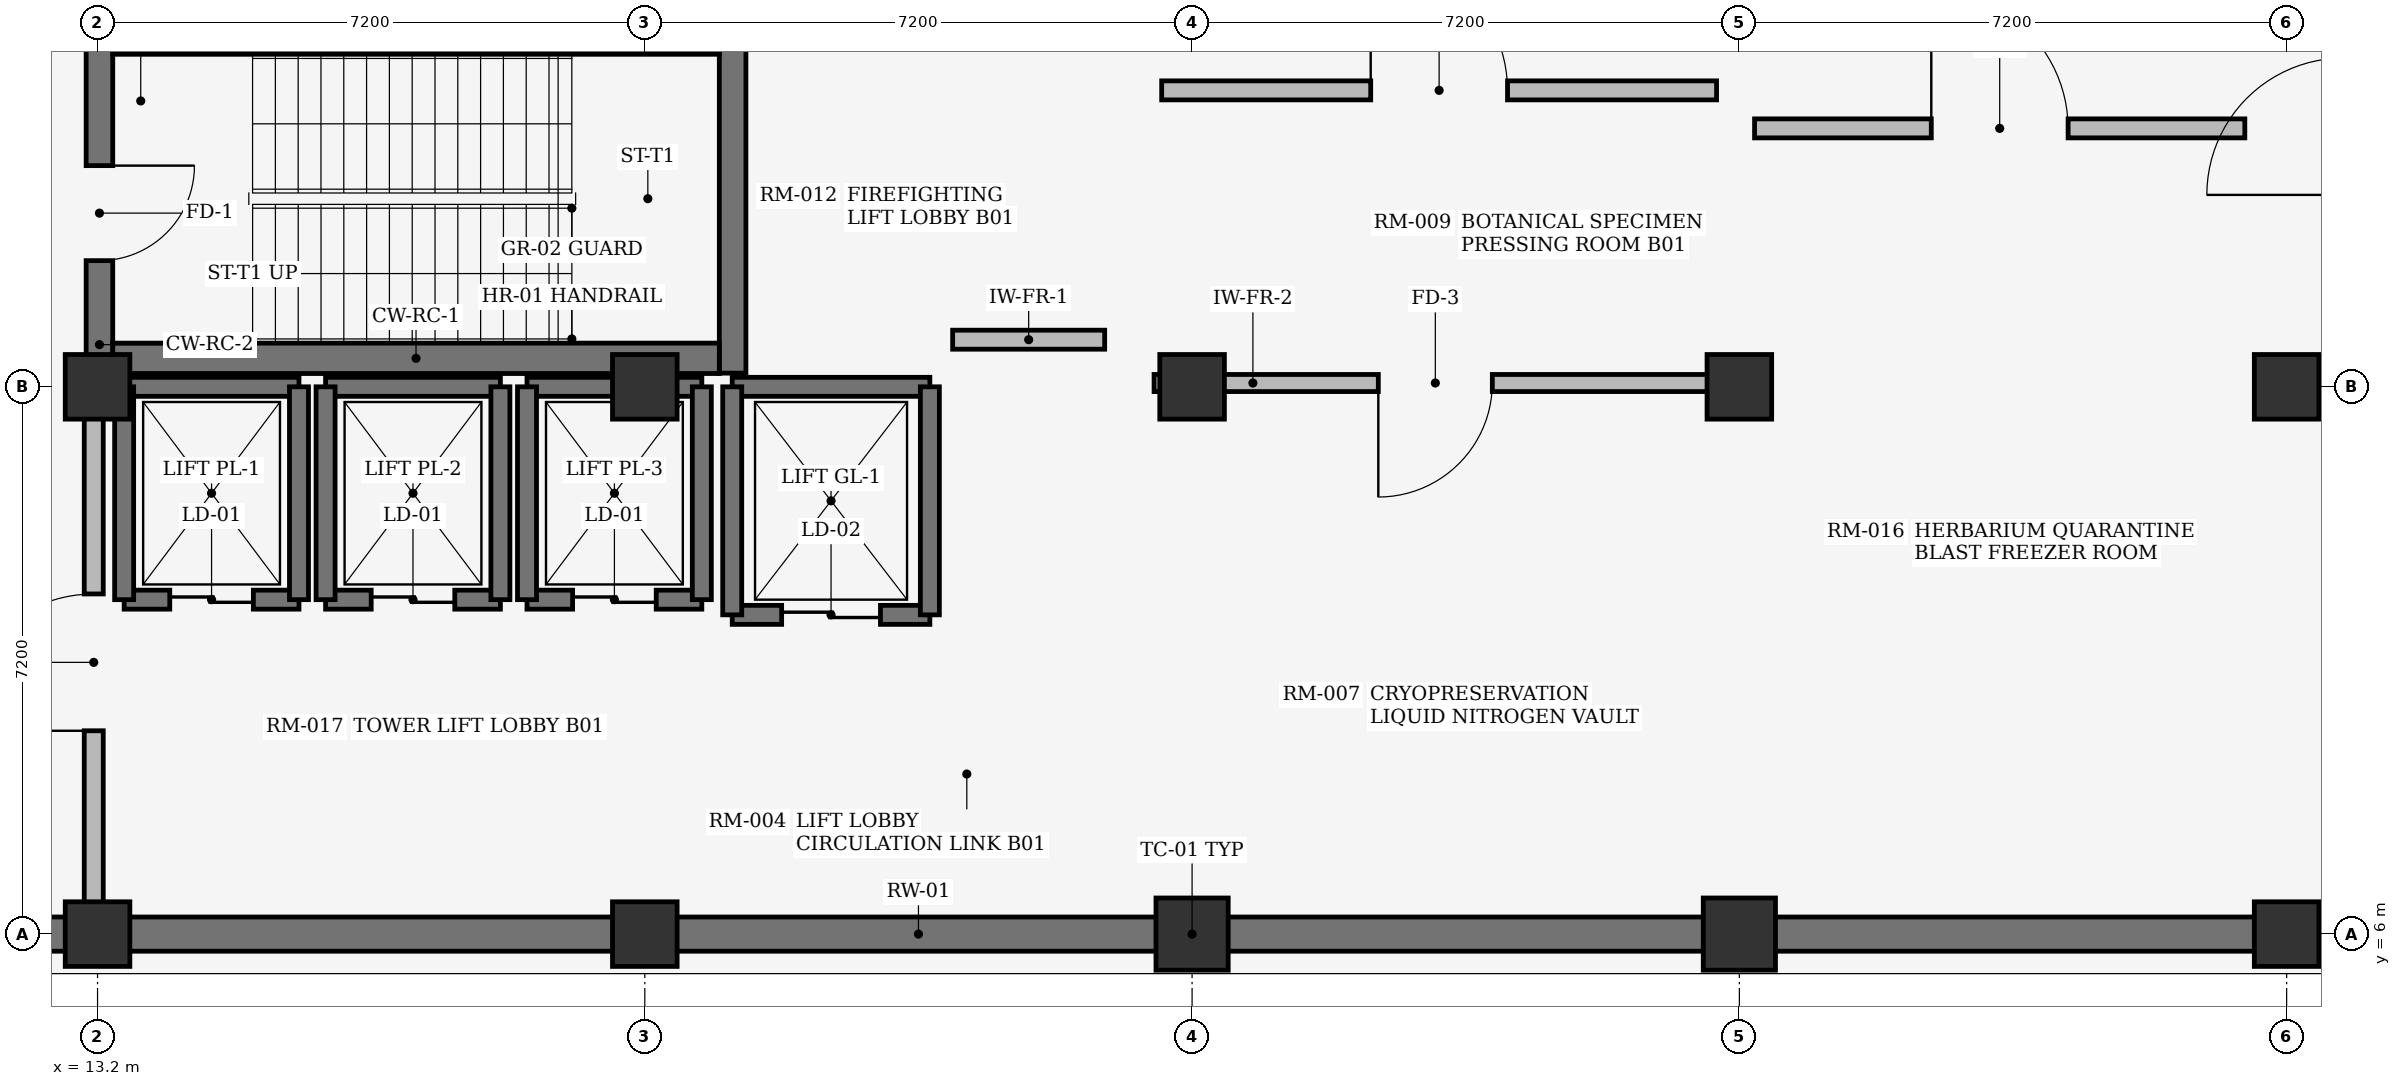
"""IFC4 building model, lengths in metres.
Left out: names, types, materials, properties, quantities, classifications, styles, units other than length and angle.
Written with IfcOpenShell. Run it as: python <this file> out.ifc"""

import sys

from ifc_helpers import new_model, si_unit, direction, frame, frame_2d, origin, origin_2d, place, context, subcontext, project, spatial, rectangle, extrude, element, fill, save


model = new_model("IFC4")
c1 = context("Model", 3, precision=1e-05, world=origin(), true_north=direction((0.0, 1.0)))
c2 = subcontext(c1, "Body", "Model", "MODEL_VIEW")
j1 = project(units=[si_unit("LENGTHUNIT", "METRE"), si_unit("PLANEANGLEUNIT", "RADIAN")], contexts=[c1])
p1 = place(None, origin())
s1 = spatial("IfcSite", under=j1, at=p1, CompositionType="ELEMENT")
p2 = place(p1, origin())
s2 = spatial("IfcBuilding", under=s1, at=p2, CompositionType="ELEMENT")
p3 = place(p2, frame((0.0, 0.0, -4.8)))
s3 = spatial("IfcBuildingStorey", under=s2, at=p3, CompositionType="ELEMENT", Elevation=-4.8)
for number, where, z_axis, x_axis in (
    (1, (13.2, 6.0, 0.0), (0.0, 0.0, 1.0), (1.0, 0.0, 0.0)),
    (2, (13.2, 13.2, 0.0), (0.0, 0.0, 1.0), (1.0, 0.0, 0.0)),
    (3, (20.4, 6.0, 0.0), (0.0, 0.0, 1.0), (1.0, 0.0, 0.0)),
    (4, (20.4, 13.2, 0.0), (0.0, 0.0, 1.0), (1.0, 0.0, 0.0)),
):
    element("IfcColumn", number, at=place(p3, frame(where, z_axis=z_axis, x_axis=x_axis)), inside=s3, PredefinedType="COLUMN", context=c2, shape_type="SweptSolid", body=[
        extrude(rectangle(XDim=0.85, YDim=0.85, at=origin_2d()), origin(), (0.0, 0.0, 1.0), 4.5),
    ])
p4 = place(p3, frame((27.6, 6.0, 0.0), z_axis=(0.0, 0.0, 1.0), x_axis=(1.0, 0.0, 0.0)))
e5 = element("IfcColumn", 5, at=p4, inside=s3, PredefinedType="COLUMN", context=c2, shape_type="SweptSolid", body=[
    extrude(rectangle(XDim=0.95, YDim=0.95, at=origin_2d()), origin(), (0.0, 0.0, 1.0), 4.5),
])
p5 = place(p3, frame((27.6, 13.2, 0.0), z_axis=(0.0, 0.0, 1.0), x_axis=(1.0, 0.0, 0.0)))
e6 = element("IfcColumn", 6, at=p5, inside=s3, PredefinedType="COLUMN", context=c2, shape_type="SweptSolid", body=[
    extrude(rectangle(XDim=0.85, YDim=0.85, at=origin_2d()), origin(), (0.0, 0.0, 1.0), 4.5),
])
p6 = place(p3, frame((34.8, 6.0, 0.0), z_axis=(0.0, 0.0, 1.0), x_axis=(1.0, 0.0, 0.0)))
e7 = element("IfcColumn", 7, at=p6, inside=s3, PredefinedType="COLUMN", context=c2, shape_type="SweptSolid", body=[
    extrude(rectangle(XDim=0.95, YDim=0.95, at=origin_2d()), origin(), (0.0, 0.0, 1.0), 4.5),
])
for number, where, z_axis, x_axis in (
    (8, (34.8, 13.2, 0.0), (0.0, 0.0, 1.0), (1.0, 0.0, 0.0)),
    (9, (42.0, 6.0, 0.0), (0.0, 0.0, 1.0), (1.0, 0.0, 0.0)),
    (10, (42.0, 13.2, 0.0), (0.0, 0.0, 1.0), (1.0, 0.0, 0.0)),
):
    element("IfcColumn", number, at=place(p3, frame(where, z_axis=z_axis, x_axis=x_axis)), inside=s3, PredefinedType="COLUMN", context=c2, shape_type="SweptSolid", body=[
        extrude(rectangle(XDim=0.85, YDim=0.85, at=origin_2d()), origin(), (0.0, 0.0, 1.0), 4.5),
    ])
p7 = place(p3, frame((6.0, 6.0, 0.0), z_axis=(0.0, 0.0, 1.0), x_axis=(1.0, 0.0, 0.0)))
e11 = element("IfcWall", 11, at=p7, inside=s3, PredefinedType="USERDEFINED", context=c2, shape_type="SweptSolid", body=[
    extrude(rectangle(XDim=36.0, YDim=0.45, at=frame_2d((18.0, 0.0))), origin(), (0.0, 0.0, 1.0), 4.5),
])
p8 = place(p3, frame((42.0, 6.0, 0.0), z_axis=(0.0, 0.0, 1.0), x_axis=(1.0, 0.0, 0.0)))
e12 = element("IfcWall", 12, at=p8, inside=s3, PredefinedType="USERDEFINED", context=c2, shape_type="SweptSolid", body=[
    extrude(rectangle(XDim=45.0, YDim=0.45, at=frame_2d((22.5, 0.0))), origin(), (0.0, 0.0, 1.0), 4.5),
])
p9 = place(p3, frame((13.225, 13.0, 0.0), z_axis=(0.0, 0.0, 1.0), x_axis=(0.0, 1.0, 0.0)))
e13 = element("IfcWall", 13, at=p9, inside=s3, PredefinedType="SHEAR", context=c2, shape_type="SweptSolid", body=[
    extrude(rectangle(XDim=4.97, YDim=0.35, at=frame_2d((2.485, 0.0))), origin(), (0.0, 0.0, 1.0), 4.5),
])
p10 = place(p9, frame((1.86, 0.0, 0.0)))
e14 = element("IfcOpeningElement", 14, at=p10, cuts=e13, PredefinedType="OPENING", context=c2, shape_type="SweptSolid", body=[
    extrude(rectangle(XDim=1.25, YDim=2.2, at=frame_2d((0.625, 1.1))), frame((0.0, 0.185, 0.0), z_axis=(0.0, -1.0, 0.0), x_axis=(1.0, 0.0, 0.0)), (0.0, 0.0, 1.0), 0.37),
])
p11 = place(p3, frame((21.555, 13.38, 0.0), z_axis=(0.0, 0.0, 1.0), x_axis=(0.0, 1.0, 0.0)))
e15 = element("IfcWall", 15, at=p11, inside=s3, PredefinedType="SHEAR", context=c2, shape_type="SweptSolid", body=[
    extrude(rectangle(XDim=4.59, YDim=0.35, at=frame_2d((2.295, 0.0))), origin(), (0.0, 0.0, 1.0), 4.5),
])
for number, where, z_axis, x_axis in (
    (16, (13.4, 13.575, 0.0), (0.0, 0.0, 1.0), (1.0, 0.0, 0.0)),
    (17, (13.4, 17.775, 0.0), (0.0, 0.0, 1.0), (1.0, 0.0, 0.0)),
):
    element("IfcWall", number, at=place(p3, frame(where, z_axis=z_axis, x_axis=x_axis)), inside=s3, PredefinedType="SHEAR", context=c2, shape_type="SweptSolid", body=[
        extrude(rectangle(XDim=7.98, YDim=0.4, at=frame_2d((3.99, 0.0))), origin(), (0.0, 0.0, 1.0), 4.5),
    ])
p12 = place(p3, frame((13.55, 10.4, 0.0), z_axis=(0.0, 0.0, 1.0), x_axis=(1.0, 0.0, 0.0)))
e18 = element("IfcWall", 18, at=p12, inside=s3, PredefinedType="SHEAR", context=c2, shape_type="SweptSolid", body=[
    extrude(rectangle(XDim=2.3, YDim=0.25, at=frame_2d((1.15, 0.0))), origin(), (0.0, 0.0, 1.0), 4.5),
])
p13 = place(p12, frame((0.6, 0.0, 0.0)))
e19 = element("IfcOpeningElement", 19, at=p13, cuts=e18, PredefinedType="OPENING", context=c2, shape_type="SweptSolid", body=[
    extrude(rectangle(XDim=1.1, YDim=2.2, at=frame_2d((0.55, 1.1))), frame((0.0, 0.135, 0.0), z_axis=(0.0, -1.0, 0.0), x_axis=(1.0, 0.0, 0.0)), (0.0, 0.0, 1.0), 0.27),
])
p14 = place(p3, frame((13.55, 13.2, 0.0), z_axis=(0.0, 0.0, 1.0), x_axis=(1.0, 0.0, 0.0)))
e20 = element("IfcWall", 20, at=p14, inside=s3, PredefinedType="SHEAR", context=c2, shape_type="SweptSolid", body=[
    extrude(rectangle(XDim=2.3, YDim=0.25, at=frame_2d((1.15, 0.0))), origin(), (0.0, 0.0, 1.0), 4.5),
])
for number, where, z_axis, x_axis in (
    (21, (13.55, 10.4, 0.0), (0.0, 0.0, 1.0), (0.0, 1.0, 0.0)),
    (22, (15.85, 10.4, 0.0), (0.0, 0.0, 1.0), (0.0, 1.0, 0.0)),
):
    element("IfcWall", number, at=place(p3, frame(where, z_axis=z_axis, x_axis=x_axis)), inside=s3, PredefinedType="SHEAR", context=c2, shape_type="SweptSolid", body=[
        extrude(rectangle(XDim=2.8, YDim=0.25, at=frame_2d((1.4, 0.0))), origin(), (0.0, 0.0, 1.0), 4.5),
    ])
p15 = place(p3, frame((16.2, 10.4, 0.0), z_axis=(0.0, 0.0, 1.0), x_axis=(1.0, 0.0, 0.0)))
e23 = element("IfcWall", 23, at=p15, inside=s3, PredefinedType="SHEAR", context=c2, shape_type="SweptSolid", body=[
    extrude(rectangle(XDim=2.3, YDim=0.25, at=frame_2d((1.15, 0.0))), origin(), (0.0, 0.0, 1.0), 4.5),
])
p16 = place(p15, frame((0.6, 0.0, 0.0)))
e24 = element("IfcOpeningElement", 24, at=p16, cuts=e23, PredefinedType="OPENING", context=c2, shape_type="SweptSolid", body=[
    extrude(rectangle(XDim=1.1, YDim=2.2, at=frame_2d((0.55, 1.1))), frame((0.0, 0.135, 0.0), z_axis=(0.0, -1.0, 0.0), x_axis=(1.0, 0.0, 0.0)), (0.0, 0.0, 1.0), 0.27),
])
p17 = place(p3, frame((16.2, 13.2, 0.0), z_axis=(0.0, 0.0, 1.0), x_axis=(1.0, 0.0, 0.0)))
e25 = element("IfcWall", 25, at=p17, inside=s3, PredefinedType="SHEAR", context=c2, shape_type="SweptSolid", body=[
    extrude(rectangle(XDim=2.3, YDim=0.25, at=frame_2d((1.15, 0.0))), origin(), (0.0, 0.0, 1.0), 4.5),
])
for number, where, z_axis, x_axis in (
    (26, (16.2, 10.4, 0.0), (0.0, 0.0, 1.0), (0.0, 1.0, 0.0)),
    (27, (18.5, 10.4, 0.0), (0.0, 0.0, 1.0), (0.0, 1.0, 0.0)),
):
    element("IfcWall", number, at=place(p3, frame(where, z_axis=z_axis, x_axis=x_axis)), inside=s3, PredefinedType="SHEAR", context=c2, shape_type="SweptSolid", body=[
        extrude(rectangle(XDim=2.8, YDim=0.25, at=frame_2d((1.4, 0.0))), origin(), (0.0, 0.0, 1.0), 4.5),
    ])
p18 = place(p3, frame((18.85, 10.4, 0.0), z_axis=(0.0, 0.0, 1.0), x_axis=(1.0, 0.0, 0.0)))
e28 = element("IfcWall", 28, at=p18, inside=s3, PredefinedType="SHEAR", context=c2, shape_type="SweptSolid", body=[
    extrude(rectangle(XDim=2.3, YDim=0.25, at=frame_2d((1.15, 0.0))), origin(), (0.0, 0.0, 1.0), 4.5),
])
p19 = place(p18, frame((0.6, 0.0, 0.0)))
e29 = element("IfcOpeningElement", 29, at=p19, cuts=e28, PredefinedType="OPENING", context=c2, shape_type="SweptSolid", body=[
    extrude(rectangle(XDim=1.1, YDim=2.2, at=frame_2d((0.55, 1.1))), frame((0.0, 0.135, 0.0), z_axis=(0.0, -1.0, 0.0), x_axis=(1.0, 0.0, 0.0)), (0.0, 0.0, 1.0), 0.27),
])
p20 = place(p3, frame((18.85, 13.2, 0.0), z_axis=(0.0, 0.0, 1.0), x_axis=(1.0, 0.0, 0.0)))
e30 = element("IfcWall", 30, at=p20, inside=s3, PredefinedType="SHEAR", context=c2, shape_type="SweptSolid", body=[
    extrude(rectangle(XDim=2.3, YDim=0.25, at=frame_2d((1.15, 0.0))), origin(), (0.0, 0.0, 1.0), 4.5),
])
for number, where, z_axis, x_axis in (
    (31, (18.85, 10.4, 0.0), (0.0, 0.0, 1.0), (0.0, 1.0, 0.0)),
    (32, (21.15, 10.4, 0.0), (0.0, 0.0, 1.0), (0.0, 1.0, 0.0)),
):
    element("IfcWall", number, at=place(p3, frame(where, z_axis=z_axis, x_axis=x_axis)), inside=s3, PredefinedType="SHEAR", context=c2, shape_type="SweptSolid", body=[
        extrude(rectangle(XDim=2.8, YDim=0.25, at=frame_2d((1.4, 0.0))), origin(), (0.0, 0.0, 1.0), 4.5),
    ])
p21 = place(p3, frame((21.55, 10.2, 0.0), z_axis=(0.0, 0.0, 1.0), x_axis=(1.0, 0.0, 0.0)))
e33 = element("IfcWall", 33, at=p21, inside=s3, PredefinedType="SHEAR", context=c2, shape_type="SweptSolid", body=[
    extrude(rectangle(XDim=2.6, YDim=0.25, at=frame_2d((1.3, 0.0))), origin(), (0.0, 0.0, 1.0), 4.5),
])
p22 = place(p21, frame((0.65, 0.0, 0.0)))
e34 = element("IfcOpeningElement", 34, at=p22, cuts=e33, PredefinedType="OPENING", context=c2, shape_type="SweptSolid", body=[
    extrude(rectangle(XDim=1.3, YDim=2.25, at=frame_2d((0.65, 1.125))), frame((0.0, 0.135, 0.0), z_axis=(0.0, -1.0, 0.0), x_axis=(1.0, 0.0, 0.0)), (0.0, 0.0, 1.0), 0.27),
])
p23 = place(p3, frame((21.55, 13.2, 0.0), z_axis=(0.0, 0.0, 1.0), x_axis=(1.0, 0.0, 0.0)))
e35 = element("IfcWall", 35, at=p23, inside=s3, PredefinedType="SHEAR", context=c2, shape_type="SweptSolid", body=[
    extrude(rectangle(XDim=2.6, YDim=0.25, at=frame_2d((1.3, 0.0))), origin(), (0.0, 0.0, 1.0), 4.5),
])
for number, where, z_axis, x_axis in (
    (36, (21.55, 10.2, 0.0), (0.0, 0.0, 1.0), (0.0, 1.0, 0.0)),
    (37, (24.15, 10.2, 0.0), (0.0, 0.0, 1.0), (0.0, 1.0, 0.0)),
):
    element("IfcWall", number, at=place(p3, frame(where, z_axis=z_axis, x_axis=x_axis)), inside=s3, PredefinedType="SHEAR", context=c2, shape_type="SweptSolid", body=[
        extrude(rectangle(XDim=3.0, YDim=0.25, at=frame_2d((1.5, 0.0))), origin(), (0.0, 0.0, 1.0), 4.5),
    ])
p24 = place(p3, frame((24.45, 13.82, 0.0), z_axis=(0.0, 0.0, 1.0), x_axis=(1.0, 0.0, 0.0)))
e38 = element("IfcWall", 38, at=p24, inside=s3, PredefinedType="SOLIDWALL", context=c2, shape_type="SweptSolid", body=[
    extrude(rectangle(XDim=2.0, YDim=0.25, at=frame_2d((1.0, 0.0))), origin(), (0.0, 0.0, 1.0), 4.48),
])
p25 = place(p3, frame((13.15, 6.05, 0.0), z_axis=(0.0, 0.0, 1.0), x_axis=(0.0, 1.0, 0.0)))
e39 = element("IfcWall", 39, at=p25, inside=s3, PredefinedType="SOLIDWALL", context=c2, shape_type="SweptSolid", body=[
    extrude(rectangle(XDim=7.05, YDim=0.25, at=frame_2d((3.525, 0.0))), origin(), (0.0, 0.0, 1.0), 3.89),
])
p26 = place(p25, frame((2.625, 0.0, 0.0)))
e40 = element("IfcOpeningElement", 40, at=p26, cuts=e39, PredefinedType="OPENING", context=c2, shape_type="SweptSolid", body=[
    extrude(rectangle(XDim=1.8, YDim=2.25, at=frame_2d((0.9, 1.125))), frame((0.0, 0.135, 0.0), z_axis=(0.0, -1.0, 0.0), x_axis=(1.0, 0.0, 0.0)), (0.0, 0.0, 1.0), 0.27),
])
p27 = place(p3, frame((27.1, 13.25, 0.0), z_axis=(0.0, 0.0, 1.0), x_axis=(1.0, 0.0, 0.0)))
e41 = element("IfcWall", 41, at=p27, inside=s3, PredefinedType="SOLIDWALL", context=c2, shape_type="SweptSolid", body=[
    extrude(rectangle(XDim=7.4, YDim=0.225, at=frame_2d((3.7, 0.0))), origin(), (0.0, 0.0, 1.0), 3.89),
])
p28 = place(p27, frame((2.95, 0.0, 0.0)))
e42 = element("IfcOpeningElement", 42, at=p28, cuts=e41, PredefinedType="OPENING", context=c2, shape_type="SweptSolid", body=[
    extrude(rectangle(XDim=1.5, YDim=2.2, at=frame_2d((0.75, 1.1))), frame((0.0, 0.123, 0.0), z_axis=(0.0, -1.0, 0.0), x_axis=(1.0, 0.0, 0.0)), (0.0, 0.0, 1.0), 0.245),
])
p29 = place(p3, frame((35.0, 16.6, 0.0), z_axis=(0.0, 0.0, 1.0), x_axis=(1.0, 0.0, 0.0)))
e43 = element("IfcWall", 43, at=p29, inside=s3, PredefinedType="SOLIDWALL", context=c2, shape_type="SweptSolid", body=[
    extrude(rectangle(XDim=6.45, YDim=0.25, at=frame_2d((3.225, 0.0))), origin(), (0.0, 0.0, 1.0), 4.48),
])
p30 = place(p29, frame((2.325, 0.0, 0.0)))
e44 = element("IfcOpeningElement", 44, at=p30, cuts=e43, PredefinedType="OPENING", context=c2, shape_type="SweptSolid", body=[
    extrude(rectangle(XDim=1.8, YDim=2.25, at=frame_2d((0.9, 1.125))), frame((0.0, 0.135, 0.0), z_axis=(0.0, -1.0, 0.0), x_axis=(1.0, 0.0, 0.0)), (0.0, 0.0, 1.0), 0.27),
])
p31 = place(p3, frame((27.2, 17.1, 0.0), z_axis=(0.0, 0.0, 1.0), x_axis=(1.0, 0.0, 0.0)))
e45 = element("IfcWall", 45, at=p31, inside=s3, PredefinedType="SOLIDWALL", context=c2, shape_type="SweptSolid", body=[
    extrude(rectangle(XDim=7.3, YDim=0.25, at=frame_2d((3.65, 0.0))), origin(), (0.0, 0.0, 1.0), 4.48),
])
p32 = place(p31, frame((2.75, 0.0, 0.0)))
e46 = element("IfcOpeningElement", 46, at=p32, cuts=e45, PredefinedType="OPENING", context=c2, shape_type="SweptSolid", body=[
    extrude(rectangle(XDim=1.8, YDim=2.25, at=frame_2d((0.9, 1.125))), frame((0.0, 0.135, 0.0), z_axis=(0.0, -1.0, 0.0), x_axis=(1.0, 0.0, 0.0)), (0.0, 0.0, 1.0), 0.27),
])
p33 = place(p10, origin())
e47 = element("IfcDoor", 47, at=p33, inside=s3, OperationType="SINGLE_SWING_RIGHT", PredefinedType="DOOR", context=c2, shape_type="SweptSolid", body=[
    extrude(rectangle(XDim=1.25, YDim=2.2, at=frame_2d((0.625, 1.1))), frame((0.0, 0.025, 0.0), z_axis=(0.0, -1.0, 0.0), x_axis=(1.0, 0.0, 0.0)), (0.0, 0.0, 1.0), 0.05),
])
fill(e14, e47)
p34 = place(p13, origin())
e48 = element("IfcDoor", 48, at=p34, inside=s3, OperationType="DOUBLE_DOOR_SLIDING", PredefinedType="DOOR", context=c2, shape_type="SweptSolid", body=[
    extrude(rectangle(XDim=1.1, YDim=2.2, at=frame_2d((0.55, 1.1))), frame((0.0, 0.025, 0.0), z_axis=(0.0, -1.0, 0.0), x_axis=(1.0, 0.0, 0.0)), (0.0, 0.0, 1.0), 0.05),
])
fill(e19, e48)
p35 = place(p16, origin())
e49 = element("IfcDoor", 49, at=p35, inside=s3, OperationType="DOUBLE_DOOR_SLIDING", PredefinedType="DOOR", context=c2, shape_type="SweptSolid", body=[
    extrude(rectangle(XDim=1.1, YDim=2.2, at=frame_2d((0.55, 1.1))), frame((0.0, 0.025, 0.0), z_axis=(0.0, -1.0, 0.0), x_axis=(1.0, 0.0, 0.0)), (0.0, 0.0, 1.0), 0.05),
])
fill(e24, e49)
p36 = place(p19, origin())
e50 = element("IfcDoor", 50, at=p36, inside=s3, OperationType="DOUBLE_DOOR_SLIDING", PredefinedType="DOOR", context=c2, shape_type="SweptSolid", body=[
    extrude(rectangle(XDim=1.1, YDim=2.2, at=frame_2d((0.55, 1.1))), frame((0.0, 0.025, 0.0), z_axis=(0.0, -1.0, 0.0), x_axis=(1.0, 0.0, 0.0)), (0.0, 0.0, 1.0), 0.05),
])
fill(e29, e50)
p37 = place(p22, origin())
e51 = element("IfcDoor", 51, at=p37, inside=s3, OperationType="DOUBLE_DOOR_SLIDING", PredefinedType="DOOR", context=c2, shape_type="SweptSolid", body=[
    extrude(rectangle(XDim=1.3, YDim=2.25, at=frame_2d((0.65, 1.125))), frame((0.0, 0.025, 0.0), z_axis=(0.0, -1.0, 0.0), x_axis=(1.0, 0.0, 0.0)), (0.0, 0.0, 1.0), 0.05),
])
fill(e34, e51)
p38 = place(p26, origin())
e52 = element("IfcDoor", 52, at=p38, inside=s3, OperationType="DOUBLE_DOOR_SINGLE_SWING", PredefinedType="DOOR", context=c2, shape_type="SweptSolid", body=[
    extrude(rectangle(XDim=1.8, YDim=2.25, at=frame_2d((0.9, 1.125))), frame((0.0, 0.025, 0.0), z_axis=(0.0, -1.0, 0.0), x_axis=(1.0, 0.0, 0.0)), (0.0, 0.0, 1.0), 0.05),
])
fill(e40, e52)
p39 = place(p28, frame((1.5, 0.0, 0.0), z_axis=(0.0, 0.0, 1.0), x_axis=(-1.0, 0.0, 0.0)))
e53 = element("IfcDoor", 53, at=p39, inside=s3, OperationType="SINGLE_SWING_LEFT", PredefinedType="DOOR", context=c2, shape_type="SweptSolid", body=[
    extrude(rectangle(XDim=1.5, YDim=2.2, at=frame_2d((0.75, 1.1))), frame((0.0, 0.025, 0.0), z_axis=(0.0, -1.0, 0.0), x_axis=(1.0, 0.0, 0.0)), (0.0, 0.0, 1.0), 0.05),
])
fill(e42, e53)
p40 = place(p30, origin())
e54 = element("IfcDoor", 54, at=p40, inside=s3, OperationType="DOUBLE_DOOR_SINGLE_SWING", PredefinedType="DOOR", context=c2, shape_type="SweptSolid", body=[
    extrude(rectangle(XDim=1.8, YDim=2.25, at=frame_2d((0.9, 1.125))), frame((0.0, 0.025, 0.0), z_axis=(0.0, -1.0, 0.0), x_axis=(1.0, 0.0, 0.0)), (0.0, 0.0, 1.0), 0.05),
])
fill(e44, e54)
p41 = place(p32, origin())
e55 = element("IfcDoor", 55, at=p41, inside=s3, OperationType="DOUBLE_DOOR_SINGLE_SWING", PredefinedType="DOOR", context=c2, shape_type="SweptSolid", body=[
    extrude(rectangle(XDim=1.8, YDim=2.25, at=frame_2d((0.9, 1.125))), frame((0.0, 0.025, 0.0), z_axis=(0.0, -1.0, 0.0), x_axis=(1.0, 0.0, 0.0)), (0.0, 0.0, 1.0), 0.05),
])
fill(e46, e55)
save(model, sys.argv[1])
